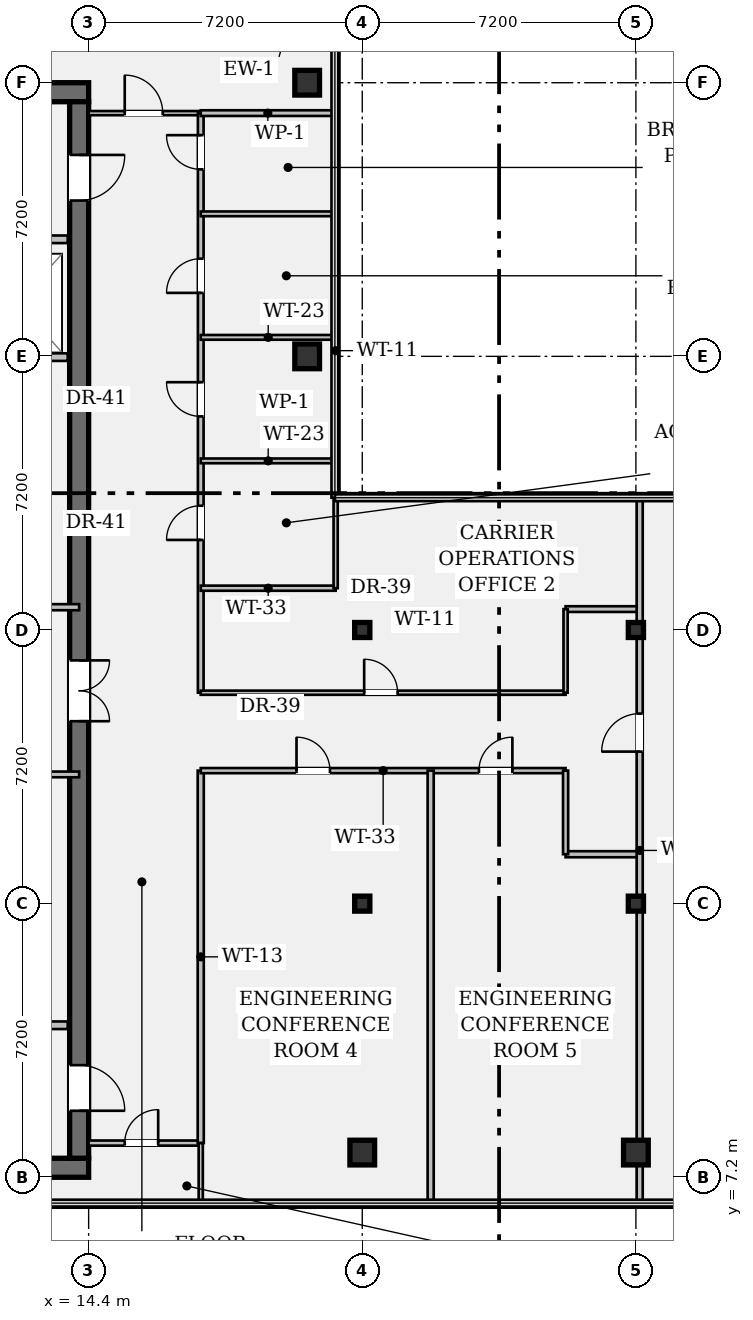
"""IFC4 building model, lengths in metres.
Left out: names, types, materials, properties, quantities, classifications, styles, units other than length and angle.
Written with IfcOpenShell. Run it as: python <this file> out.ifc"""

import sys

from ifc_helpers import new_model, si_unit, direction, frame, frame_2d, origin, origin_2d, place, context, subcontext, project, spatial, rectangle, hollow_rectangle, i_section, extrude, element, fill, save


model = new_model("IFC4")
c1 = context("Model", 3, precision=1e-05, world=origin(), true_north=direction((0.0, 1.0)))
c2 = subcontext(c1, "Body", "Model", "MODEL_VIEW")
j1 = project(units=[si_unit("LENGTHUNIT", "METRE"), si_unit("PLANEANGLEUNIT", "RADIAN")], contexts=[c1])
p1 = place(None, origin())
s1 = spatial("IfcSite", under=j1, at=p1, CompositionType="ELEMENT")
p2 = place(p1, origin())
s2 = spatial("IfcBuilding", under=s1, at=p2, CompositionType="ELEMENT")
p3 = place(p2, frame((0.0, 0.0, 269.15)))
s3 = spatial("IfcBuildingStorey", under=s2, at=p3, CompositionType="ELEMENT", Elevation=269.15)
for number, where, z_axis, x_axis in (
    (1, (0.5, 7.45, 0.0), (0.0, 0.0, 1.0), (1.0, 0.0, 0.0)),
    (2, (0.5, 35.75, 0.0), (0.0, 0.0, 1.0), (1.0, 0.0, 0.0)),
):
    element("IfcWall", number, at=place(p3, frame(where, z_axis=z_axis, x_axis=x_axis)), inside=s3, PredefinedType="SHEAR", context=c2, shape_type="SweptSolid", body=[
        extrude(rectangle(XDim=13.9, YDim=0.5, at=frame_2d((6.95, 0.0))), origin(), (0.0, 0.0, 1.0), 3.24),
    ])
p4 = place(p3, frame((14.15, 35.5, 0.0), z_axis=(0.0, 0.0, 1.0), x_axis=(0.0, -1.0, 0.0)))
e3 = element("IfcWall", 3, at=p4, inside=s3, PredefinedType="SHEAR", context=c2, shape_type="SweptSolid", body=[
    extrude(rectangle(XDim=27.8, YDim=0.5, at=frame_2d((13.9, 0.0))), origin(), (0.0, 0.0, 1.0), 3.24),
])
p5 = place(p4, frame((1.4, 0.0, 0.0)))
e4 = element("IfcOpeningElement", 4, at=p5, cuts=e3, PredefinedType="OPENING", context=c2, shape_type="SweptSolid", body=[
    extrude(rectangle(XDim=1.2, YDim=2.15, at=frame_2d((0.6, 1.075))), frame((0.0, 0.262, 0.0), z_axis=(0.0, -1.0, 0.0), x_axis=(1.0, 0.0, 0.0)), (0.0, 0.0, 1.0), 0.524),
])
p6 = place(p4, frame((25.35, 0.0, 0.0)))
e5 = element("IfcOpeningElement", 5, at=p6, cuts=e3, PredefinedType="OPENING", context=c2, shape_type="SweptSolid", body=[
    extrude(rectangle(XDim=1.2, YDim=2.15, at=frame_2d((0.6, 1.075))), frame((0.0, 0.262, 0.0), z_axis=(0.0, -1.0, 0.0), x_axis=(1.0, 0.0, 0.0)), (0.0, 0.0, 1.0), 0.524),
])
p7 = place(p4, frame((14.7, 0.0, 0.0)))
e6 = element("IfcOpeningElement", 6, at=p7, cuts=e3, PredefinedType="OPENING", context=c2, shape_type="SweptSolid", body=[
    extrude(rectangle(XDim=1.6, YDim=2.2, at=frame_2d((0.8, 1.1))), frame((0.0, 0.262, 0.0), z_axis=(0.0, -1.0, 0.0), x_axis=(1.0, 0.0, 0.0)), (0.0, 0.0, 1.0), 0.524),
])
for number, where, z_axis, x_axis in (
    (7, (20.15, 28.8, 0.0), (0.0, 0.0, 1.0), (1.0, 0.0, 0.0)),
    (8, (20.15, 36.0, 0.0), (0.0, 0.0, 1.0), (1.0, 0.0, 0.0)),
    (9, (21.6, 7.85, 0.0), (0.0, 0.0, 1.0), (1.0, 0.0, 0.0)),
):
    element("IfcColumn", number, at=place(p3, frame(where, z_axis=z_axis, x_axis=x_axis)), inside=s3, PredefinedType="COLUMN", context=c2, shape_type="SweptSolid", body=[
        extrude(hollow_rectangle(XDim=0.65, YDim=0.65, WallThickness=0.04, at=origin_2d()), origin(), (0.0, 0.0, 1.0), 3.24),
    ])
for number, where, z_axis, x_axis in (
    (10, (21.6, 14.4, 0.0), (0.0, 0.0, 1.0), (1.0, 0.0, 0.0)),
    (11, (21.6, 21.6, 0.0), (0.0, 0.0, 1.0), (1.0, 0.0, 0.0)),
):
    element("IfcColumn", number, at=place(p3, frame(where, z_axis=z_axis, x_axis=x_axis)), inside=s3, PredefinedType="COLUMN", context=c2, shape_type="SweptSolid", body=[
        extrude(i_section(OverallWidth=0.399, OverallDepth=0.394, WebThickness=0.023, FlangeThickness=0.037, FilletRadius=0.018, at=origin_2d()), origin(), (0.0, 0.0, 1.0), 3.24),
    ])
p8 = place(p3, frame((28.8, 7.85, 0.0), z_axis=(0.0, 0.0, 1.0), x_axis=(1.0, 0.0, 0.0)))
e12 = element("IfcColumn", 12, at=p8, inside=s3, PredefinedType="COLUMN", context=c2, shape_type="SweptSolid", body=[
    extrude(hollow_rectangle(XDim=0.65, YDim=0.65, WallThickness=0.04, at=origin_2d()), origin(), (0.0, 0.0, 1.0), 3.24),
])
for number, where, z_axis, x_axis in (
    (13, (28.8, 14.4, 0.0), (0.0, 0.0, 1.0), (1.0, 0.0, 0.0)),
    (14, (28.8, 21.6, 0.0), (0.0, 0.0, 1.0), (1.0, 0.0, 0.0)),
):
    element("IfcColumn", number, at=place(p3, frame(where, z_axis=z_axis, x_axis=x_axis)), inside=s3, PredefinedType="COLUMN", context=c2, shape_type="SweptSolid", body=[
        extrude(i_section(OverallWidth=0.399, OverallDepth=0.394, WebThickness=0.023, FlangeThickness=0.037, FilletRadius=0.018, at=origin_2d()), origin(), (0.0, 0.0, 1.0), 3.24),
    ])
p9 = place(p3, frame((8.7, 31.88, 0.0), z_axis=(0.0, 0.0, 1.0), x_axis=(1.0, 0.0, 0.0)))
e15 = element("IfcWall", 15, at=p9, inside=s3, PredefinedType="PARTITIONING", context=c2, shape_type="SweptSolid", body=[
    extrude(rectangle(XDim=5.15, YDim=0.2, at=frame_2d((2.575, 0.0))), origin(), (0.0, 0.0, 1.0), 3.24),
])
p10 = place(p9, frame((0.75, 0.0, 0.0)))
e16 = element("IfcOpeningElement", 16, at=p10, cuts=e15, PredefinedType="OPENING", context=c2, shape_type="SweptSolid", body=[
    extrude(rectangle(XDim=1.2, YDim=2.2, at=frame_2d((0.6, 1.1))), frame((0.0, 0.112, 0.0), z_axis=(0.0, -1.0, 0.0), x_axis=(1.0, 0.0, 0.0)), (0.0, 0.0, 1.0), 0.224),
])
p11 = place(p9, frame((3.25, 0.0, 0.0)))
e17 = element("IfcOpeningElement", 17, at=p11, cuts=e15, PredefinedType="OPENING", context=c2, shape_type="SweptSolid", body=[
    extrude(rectangle(XDim=1.2, YDim=2.2, at=frame_2d((0.6, 1.1))), frame((0.0, 0.112, 0.0), z_axis=(0.0, -1.0, 0.0), x_axis=(1.0, 0.0, 0.0)), (0.0, 0.0, 1.0), 0.224),
])
for number, where, z_axis, x_axis in (
    (18, (8.7, 11.2, 0.0), (0.0, 0.0, 1.0), (1.0, 0.0, 0.0)),
    (19, (8.7, 28.78, 0.0), (0.0, 0.0, 1.0), (1.0, 0.0, 0.0)),
):
    element("IfcWall", number, at=place(p3, frame(where, z_axis=z_axis, x_axis=x_axis)), inside=s3, PredefinedType="PARTITIONING", context=c2, shape_type="SweptSolid", body=[
        extrude(rectangle(XDim=5.15, YDim=0.2, at=frame_2d((2.575, 0.0))), origin(), (0.0, 0.0, 1.0), 3.24),
    ])
p12 = place(p3, frame((7.1, 22.2, 0.0), z_axis=(0.0, 0.0, 1.0), x_axis=(1.0, 0.0, 0.0)))
e20 = element("IfcWall", 20, at=p12, inside=s3, PredefinedType="PARTITIONING", context=c2, shape_type="SweptSolid", body=[
    extrude(rectangle(XDim=7.05, YDim=0.16, at=frame_2d((3.525, 0.0))), origin(), (0.0, 0.0, 1.0), 3.24),
])
p13 = place(p12, frame((2.4, 0.0, 0.0)))
e21 = element("IfcOpeningElement", 21, at=p13, cuts=e20, PredefinedType="OPENING", context=c2, shape_type="SweptSolid", body=[
    extrude(rectangle(XDim=1.0, YDim=2.15, at=frame_2d((0.5, 1.075))), frame((0.0, 0.092, 0.0), z_axis=(0.0, -1.0, 0.0), x_axis=(1.0, 0.0, 0.0)), (0.0, 0.0, 1.0), 0.184),
])
p14 = place(p3, frame((5.15, 17.8, 0.0), z_axis=(0.0, 0.0, 1.0), x_axis=(1.0, 0.0, 0.0)))
e22 = element("IfcWall", 22, at=p14, inside=s3, PredefinedType="PARTITIONING", context=c2, shape_type="SweptSolid", body=[
    extrude(rectangle(XDim=9.0, YDim=0.15, at=frame_2d((4.5, 0.0))), origin(), (0.0, 0.0, 1.0), 3.24),
])
p15 = place(p14, frame((2.65, 0.0, 0.0)))
e23 = element("IfcOpeningElement", 23, at=p15, cuts=e22, PredefinedType="OPENING", context=c2, shape_type="SweptSolid", body=[
    extrude(rectangle(XDim=0.9, YDim=2.15, at=frame_2d((0.45, 1.075))), frame((0.0, 0.087, 0.0), z_axis=(0.0, -1.0, 0.0), x_axis=(1.0, 0.0, 0.0)), (0.0, 0.0, 1.0), 0.174),
])
p16 = place(p14, frame((6.15, 0.0, 0.0)))
e24 = element("IfcOpeningElement", 24, at=p16, cuts=e22, PredefinedType="OPENING", context=c2, shape_type="SweptSolid", body=[
    extrude(rectangle(XDim=0.88, YDim=2.15, at=frame_2d((0.44, 1.075))), frame((0.0, 0.087, 0.0), z_axis=(0.0, -1.0, 0.0), x_axis=(1.0, 0.0, 0.0)), (0.0, 0.0, 1.0), 0.174),
])
p17 = place(p3, frame((14.4, 8.1, 0.0), z_axis=(0.0, 0.0, 1.0), x_axis=(1.0, 0.0, 0.0)))
e25 = element("IfcWall", 25, at=p17, inside=s3, PredefinedType="PARTITIONING", context=c2, shape_type="SweptSolid", body=[
    extrude(rectangle(XDim=2.95, YDim=0.135, at=frame_2d((1.475, 0.0))), origin(), (0.0, 0.0, 1.0), 3.24),
])
p18 = place(p17, frame((0.95, 0.0, 0.0)))
e26 = element("IfcOpeningElement", 26, at=p18, cuts=e25, PredefinedType="OPENING", context=c2, shape_type="SweptSolid", body=[
    extrude(rectangle(XDim=0.88, YDim=2.15, at=frame_2d((0.44, 1.075))), frame((0.0, 0.08, 0.0), z_axis=(0.0, -1.0, 0.0), x_axis=(1.0, 0.0, 0.0)), (0.0, 0.0, 1.0), 0.159),
])
p19 = place(p3, frame((14.4, 35.2, 0.0), z_axis=(0.0, 0.0, 1.0), x_axis=(1.0, 0.0, 0.0)))
e27 = element("IfcWall", 27, at=p19, inside=s3, PredefinedType="PARTITIONING", context=c2, shape_type="SweptSolid", body=[
    extrude(rectangle(XDim=2.95, YDim=0.11, at=frame_2d((1.475, 0.0))), origin(), (0.0, 0.0, 1.0), 2.808),
])
p20 = place(p19, frame((0.95, 0.0, 0.0)))
e28 = element("IfcOpeningElement", 28, at=p20, cuts=e27, PredefinedType="OPENING", context=c2, shape_type="SweptSolid", body=[
    extrude(rectangle(XDim=1.0, YDim=2.15, at=frame_2d((0.5, 1.075))), frame((0.0, 0.067, 0.0), z_axis=(0.0, -1.0, 0.0), x_axis=(1.0, 0.0, 0.0)), (0.0, 0.0, 1.0), 0.134),
])
p21 = place(p3, frame((17.35, 8.1, 0.0), z_axis=(0.0, 0.0, 1.0), x_axis=(0.0, 1.0, 0.0)))
e29 = element("IfcWall", 29, at=p21, inside=s3, PredefinedType="PARTITIONING", context=c2, shape_type="SweptSolid", body=[
    extrude(rectangle(XDim=9.8, YDim=0.16, at=frame_2d((4.9, 0.0))), origin(), (0.0, 0.0, 1.0), 2.676),
])
p22 = place(p3, frame((17.35, 19.95, 0.0), z_axis=(0.0, 0.0, 1.0), x_axis=(0.0, 1.0, 0.0)))
e30 = element("IfcWall", 30, at=p22, inside=s3, PredefinedType="PARTITIONING", context=c2, shape_type="SweptSolid", body=[
    extrude(rectangle(XDim=15.25, YDim=0.15, at=frame_2d((7.625, 0.0))), origin(), (0.0, 0.0, 1.0), 2.676),
])
p23 = place(p22, frame((4.02, 0.0, 0.0)))
e31 = element("IfcOpeningElement", 31, at=p23, cuts=e30, PredefinedType="OPENING", context=c2, shape_type="SweptSolid", body=[
    extrude(rectangle(XDim=0.9, YDim=2.15, at=frame_2d((0.45, 1.075))), frame((0.0, 0.087, 0.0), z_axis=(0.0, -1.0, 0.0), x_axis=(1.0, 0.0, 0.0)), (0.0, 0.0, 1.0), 0.174),
])
p24 = place(p22, frame((7.27, 0.0, 0.0)))
e32 = element("IfcOpeningElement", 32, at=p24, cuts=e30, PredefinedType="OPENING", context=c2, shape_type="SweptSolid", body=[
    extrude(rectangle(XDim=0.9, YDim=2.15, at=frame_2d((0.45, 1.075))), frame((0.0, 0.087, 0.0), z_axis=(0.0, -1.0, 0.0), x_axis=(1.0, 0.0, 0.0)), (0.0, 0.0, 1.0), 0.174),
])
p25 = place(p22, frame((10.52, 0.0, 0.0)))
e33 = element("IfcOpeningElement", 33, at=p25, cuts=e30, PredefinedType="OPENING", context=c2, shape_type="SweptSolid", body=[
    extrude(rectangle(XDim=0.9, YDim=2.15, at=frame_2d((0.45, 1.075))), frame((0.0, 0.087, 0.0), z_axis=(0.0, -1.0, 0.0), x_axis=(1.0, 0.0, 0.0)), (0.0, 0.0, 1.0), 0.174),
])
p26 = place(p22, frame((13.77, 0.0, 0.0)))
e34 = element("IfcOpeningElement", 34, at=p26, cuts=e30, PredefinedType="OPENING", context=c2, shape_type="SweptSolid", body=[
    extrude(rectangle(XDim=0.9, YDim=2.15, at=frame_2d((0.45, 1.075))), frame((0.0, 0.087, 0.0), z_axis=(0.0, -1.0, 0.0), x_axis=(1.0, 0.0, 0.0)), (0.0, 0.0, 1.0), 0.174),
])
p27 = place(p3, frame((17.35, 17.9, 0.0), z_axis=(0.0, 0.0, 1.0), x_axis=(1.0, 0.0, 0.0)))
e35 = element("IfcWall", 35, at=p27, inside=s3, PredefinedType="PARTITIONING", context=c2, shape_type="SweptSolid", body=[
    extrude(rectangle(XDim=9.6, YDim=0.135, at=frame_2d((4.8, 0.0))), origin(), (0.0, 0.0, 1.0), 2.676),
])
p28 = place(p27, frame((2.52, 0.0, 0.0)))
e36 = element("IfcOpeningElement", 36, at=p28, cuts=e35, PredefinedType="OPENING", context=c2, shape_type="SweptSolid", body=[
    extrude(rectangle(XDim=0.88, YDim=2.15, at=frame_2d((0.44, 1.075))), frame((0.0, 0.08, 0.0), z_axis=(0.0, -1.0, 0.0), x_axis=(1.0, 0.0, 0.0)), (0.0, 0.0, 1.0), 0.159),
])
p29 = place(p27, frame((7.32, 0.0, 0.0)))
e37 = element("IfcOpeningElement", 37, at=p29, cuts=e35, PredefinedType="OPENING", context=c2, shape_type="SweptSolid", body=[
    extrude(rectangle(XDim=0.88, YDim=2.15, at=frame_2d((0.44, 1.075))), frame((0.0, 0.08, 0.0), z_axis=(0.0, -1.0, 0.0), x_axis=(1.0, 0.0, 0.0)), (0.0, 0.0, 1.0), 0.159),
])
p30 = place(p3, frame((17.35, 19.95, 0.0), z_axis=(0.0, 0.0, 1.0), x_axis=(1.0, 0.0, 0.0)))
e38 = element("IfcWall", 38, at=p30, inside=s3, PredefinedType="PARTITIONING", context=c2, shape_type="SweptSolid", body=[
    extrude(rectangle(XDim=9.6, YDim=0.11, at=frame_2d((4.8, 0.0))), origin(), (0.0, 0.0, 1.0), 2.676),
])
p31 = place(p30, frame((4.3, 0.0, 0.0)))
e39 = element("IfcOpeningElement", 39, at=p31, cuts=e38, PredefinedType="OPENING", context=c2, shape_type="SweptSolid", body=[
    extrude(rectangle(XDim=0.88, YDim=2.15, at=frame_2d((0.44, 1.075))), frame((0.0, 0.067, 0.0), z_axis=(0.0, -1.0, 0.0), x_axis=(1.0, 0.0, 0.0)), (0.0, 0.0, 1.0), 0.134),
])
p32 = place(p3, frame((26.95, 15.7, 0.0), z_axis=(0.0, 0.0, 1.0), x_axis=(1.0, 0.0, 0.0)))
e40 = element("IfcWall", 40, at=p32, inside=s3, PredefinedType="PARTITIONING", context=c2, shape_type="SweptSolid", body=[
    extrude(rectangle(XDim=1.95, YDim=0.16, at=frame_2d((0.975, 0.0))), origin(), (0.0, 0.0, 1.0), 2.676),
])
p33 = place(p3, frame((26.95, 22.15, 0.0), z_axis=(0.0, 0.0, 1.0), x_axis=(1.0, 0.0, 0.0)))
e41 = element("IfcWall", 41, at=p33, inside=s3, PredefinedType="PARTITIONING", context=c2, shape_type="SweptSolid", body=[
    extrude(rectangle(XDim=1.95, YDim=0.15, at=frame_2d((0.975, 0.0))), origin(), (0.0, 0.0, 1.0), 3.24),
])
p34 = place(p3, frame((26.95, 15.7, 0.0), z_axis=(0.0, 0.0, 1.0), x_axis=(0.0, 1.0, 0.0)))
e42 = element("IfcWall", 42, at=p34, inside=s3, PredefinedType="PARTITIONING", context=c2, shape_type="SweptSolid", body=[
    extrude(rectangle(XDim=2.2, YDim=0.135, at=frame_2d((1.1, 0.0))), origin(), (0.0, 0.0, 1.0), 3.24),
])
p35 = place(p3, frame((26.95, 19.95, 0.0), z_axis=(0.0, 0.0, 1.0), x_axis=(0.0, 1.0, 0.0)))
e43 = element("IfcWall", 43, at=p35, inside=s3, PredefinedType="PARTITIONING", context=c2, shape_type="SweptSolid", body=[
    extrude(rectangle(XDim=2.2, YDim=0.11, at=frame_2d((1.1, 0.0))), origin(), (0.0, 0.0, 1.0), 2.676),
])
p36 = place(p3, frame((28.9, 6.52, 0.0), z_axis=(0.0, 0.0, 1.0), x_axis=(0.0, 1.0, 0.0)))
e44 = element("IfcWall", 44, at=p36, inside=s3, PredefinedType="PARTITIONING", context=c2, shape_type="SweptSolid", body=[
    extrude(rectangle(XDim=18.56, YDim=0.16, at=frame_2d((9.28, 0.0))), origin(), (0.0, 0.0, 1.0), 2.676),
])
p37 = place(p36, frame((11.88, 0.0, 0.0)))
e45 = element("IfcOpeningElement", 45, at=p37, cuts=e44, PredefinedType="OPENING", context=c2, shape_type="SweptSolid", body=[
    extrude(rectangle(XDim=1.0, YDim=2.15, at=frame_2d((0.5, 1.075))), frame((0.0, 0.092, 0.0), z_axis=(0.0, -1.0, 0.0), x_axis=(1.0, 0.0, 0.0)), (0.0, 0.0, 1.0), 0.184),
])
p38 = place(p3, frame((17.35, 35.2, 0.0), z_axis=(0.0, 0.0, 1.0), x_axis=(1.0, 0.0, 0.0)))
e46 = element("IfcWall", 46, at=p38, inside=s3, PredefinedType="PARTITIONING", context=c2, shape_type="SweptSolid", body=[
    extrude(rectangle(XDim=3.53, YDim=0.15, at=frame_2d((1.765, 0.0))), origin(), (0.0, 0.0, 1.0), 2.808),
])
p39 = place(p3, frame((17.35, 22.7, 0.0), z_axis=(0.0, 0.0, 1.0), x_axis=(1.0, 0.0, 0.0)))
e47 = element("IfcWall", 47, at=p39, inside=s3, PredefinedType="PARTITIONING", context=c2, shape_type="SweptSolid", body=[
    extrude(rectangle(XDim=3.55, YDim=0.135, at=frame_2d((1.775, 0.0))), origin(), (0.0, 0.0, 1.0), 2.808),
])
p40 = place(p3, frame((20.9, 22.7, 0.0), z_axis=(0.0, 0.0, 1.0), x_axis=(0.0, 1.0, 0.0)))
e48 = element("IfcWall", 48, at=p40, inside=s3, PredefinedType="PARTITIONING", context=c2, shape_type="SweptSolid", body=[
    extrude(rectangle(XDim=12.5, YDim=0.11, at=frame_2d((6.25, 0.0))), origin(), (0.0, 0.0, 1.0), 3.24),
])
for number, where, z_axis, x_axis in (
    (49, (17.35, 26.05, 0.0), (0.0, 0.0, 1.0), (1.0, 0.0, 0.0)),
    (50, (17.35, 29.3, 0.0), (0.0, 0.0, 1.0), (1.0, 0.0, 0.0)),
    (51, (17.35, 32.55, 0.0), (0.0, 0.0, 1.0), (1.0, 0.0, 0.0)),
):
    element("IfcWall", number, at=place(p3, frame(where, z_axis=z_axis, x_axis=x_axis)), inside=s3, PredefinedType="PARTITIONING", context=c2, shape_type="SweptSolid", body=[
        extrude(rectangle(XDim=3.55, YDim=0.125, at=frame_2d((1.775, 0.0))), origin(), (0.0, 0.0, 1.0), 2.808),
    ])
p41 = place(p3, frame((17.35, 6.52, 0.0), z_axis=(0.0, 0.0, 1.0), x_axis=(0.0, 1.0, 0.0)))
e52 = element("IfcWall", 52, at=p41, inside=s3, PredefinedType="PARTITIONING", context=c2, shape_type="SweptSolid", body=[
    extrude(rectangle(XDim=1.58, YDim=0.11, at=frame_2d((0.79, 0.0))), origin(), (0.0, 0.0, 1.0), 3.24),
])
p42 = place(p3, frame((23.4, 6.52, 0.0), z_axis=(0.0, 0.0, 1.0), x_axis=(0.0, 1.0, 0.0)))
e53 = element("IfcWall", 53, at=p42, inside=s3, PredefinedType="PARTITIONING", context=c2, shape_type="SweptSolid", body=[
    extrude(rectangle(XDim=11.38, YDim=0.16, at=frame_2d((5.69, 0.0))), origin(), (0.0, 0.0, 1.0), 2.676),
])
p43 = place(p5, origin())
e54 = element("IfcDoor", 54, at=p43, inside=s3, OperationType="SINGLE_SWING_LEFT", PredefinedType="DOOR", context=c2, shape_type="SweptSolid", body=[
    extrude(rectangle(XDim=1.2, YDim=2.15, at=frame_2d((0.6, 1.075))), frame((0.0, 0.025, 0.0), z_axis=(0.0, -1.0, 0.0), x_axis=(1.0, 0.0, 0.0)), (0.0, 0.0, 1.0), 0.05),
])
fill(e4, e54)
p44 = place(p6, origin())
e55 = element("IfcDoor", 55, at=p44, inside=s3, OperationType="SINGLE_SWING_RIGHT", PredefinedType="DOOR", context=c2, shape_type="SweptSolid", body=[
    extrude(rectangle(XDim=1.2, YDim=2.15, at=frame_2d((0.6, 1.075))), frame((0.0, 0.025, 0.0), z_axis=(0.0, -1.0, 0.0), x_axis=(1.0, 0.0, 0.0)), (0.0, 0.0, 1.0), 0.05),
])
fill(e5, e55)
p45 = place(p7, origin())
e56 = element("IfcDoor", 56, at=p45, inside=s3, OperationType="DOUBLE_DOOR_SINGLE_SWING", PredefinedType="DOOR", context=c2, shape_type="SweptSolid", body=[
    extrude(rectangle(XDim=1.6, YDim=2.2, at=frame_2d((0.8, 1.1))), frame((0.0, 0.025, 0.0), z_axis=(0.0, -1.0, 0.0), x_axis=(1.0, 0.0, 0.0)), (0.0, 0.0, 1.0), 0.05),
])
fill(e6, e56)
p46 = place(p20, origin())
e57 = element("IfcDoor", 57, at=p46, inside=s3, OperationType="SINGLE_SWING_LEFT", PredefinedType="DOOR", context=c2, shape_type="SweptSolid", body=[
    extrude(rectangle(XDim=1.0, YDim=2.15, at=frame_2d((0.5, 1.075))), frame((0.0, 0.025, 0.0), z_axis=(0.0, -1.0, 0.0), x_axis=(1.0, 0.0, 0.0)), (0.0, 0.0, 1.0), 0.05),
])
fill(e28, e57)
p47 = place(p23, origin())
e58 = element("IfcDoor", 58, at=p47, inside=s3, OperationType="SINGLE_SWING_LEFT", PredefinedType="DOOR", context=c2, shape_type="SweptSolid", body=[
    extrude(rectangle(XDim=0.9, YDim=2.15, at=frame_2d((0.45, 1.075))), frame((0.0, 0.025, 0.0), z_axis=(0.0, -1.0, 0.0), x_axis=(1.0, 0.0, 0.0)), (0.0, 0.0, 1.0), 0.05),
])
fill(e31, e58)
p48 = place(p24, origin())
e59 = element("IfcDoor", 59, at=p48, inside=s3, OperationType="SINGLE_SWING_RIGHT", PredefinedType="DOOR", context=c2, shape_type="SweptSolid", body=[
    extrude(rectangle(XDim=0.9, YDim=2.15, at=frame_2d((0.45, 1.075))), frame((0.0, 0.025, 0.0), z_axis=(0.0, -1.0, 0.0), x_axis=(1.0, 0.0, 0.0)), (0.0, 0.0, 1.0), 0.05),
])
fill(e32, e59)
p49 = place(p25, origin())
e60 = element("IfcDoor", 60, at=p49, inside=s3, OperationType="SINGLE_SWING_LEFT", PredefinedType="DOOR", context=c2, shape_type="SweptSolid", body=[
    extrude(rectangle(XDim=0.9, YDim=2.15, at=frame_2d((0.45, 1.075))), frame((0.0, 0.025, 0.0), z_axis=(0.0, -1.0, 0.0), x_axis=(1.0, 0.0, 0.0)), (0.0, 0.0, 1.0), 0.05),
])
fill(e33, e60)
p50 = place(p26, origin())
e61 = element("IfcDoor", 61, at=p50, inside=s3, OperationType="SINGLE_SWING_RIGHT", PredefinedType="DOOR", context=c2, shape_type="SweptSolid", body=[
    extrude(rectangle(XDim=0.9, YDim=2.15, at=frame_2d((0.45, 1.075))), frame((0.0, 0.025, 0.0), z_axis=(0.0, -1.0, 0.0), x_axis=(1.0, 0.0, 0.0)), (0.0, 0.0, 1.0), 0.05),
])
fill(e34, e61)
p51 = place(p31, origin())
e62 = element("IfcDoor", 62, at=p51, inside=s3, OperationType="SINGLE_SWING_LEFT", PredefinedType="DOOR", context=c2, shape_type="SweptSolid", body=[
    extrude(rectangle(XDim=0.88, YDim=2.15, at=frame_2d((0.44, 1.075))), frame((0.0, 0.025, 0.0), z_axis=(0.0, -1.0, 0.0), x_axis=(1.0, 0.0, 0.0)), (0.0, 0.0, 1.0), 0.05),
])
fill(e39, e62)
p52 = place(p18, origin())
e63 = element("IfcDoor", 63, at=p52, inside=s3, OperationType="SINGLE_SWING_RIGHT", PredefinedType="DOOR", context=c2, shape_type="SweptSolid", body=[
    extrude(rectangle(XDim=0.88, YDim=2.15, at=frame_2d((0.44, 1.075))), frame((0.0, 0.025, 0.0), z_axis=(0.0, -1.0, 0.0), x_axis=(1.0, 0.0, 0.0)), (0.0, 0.0, 1.0), 0.05),
])
fill(e26, e63)
p53 = place(p28, origin())
e64 = element("IfcDoor", 64, at=p53, inside=s3, OperationType="SINGLE_SWING_LEFT", PredefinedType="DOOR", context=c2, shape_type="SweptSolid", body=[
    extrude(rectangle(XDim=0.88, YDim=2.15, at=frame_2d((0.44, 1.075))), frame((0.0, 0.025, 0.0), z_axis=(0.0, -1.0, 0.0), x_axis=(1.0, 0.0, 0.0)), (0.0, 0.0, 1.0), 0.05),
])
fill(e36, e64)
p54 = place(p29, origin())
e65 = element("IfcDoor", 65, at=p54, inside=s3, OperationType="SINGLE_SWING_RIGHT", PredefinedType="DOOR", context=c2, shape_type="SweptSolid", body=[
    extrude(rectangle(XDim=0.88, YDim=2.15, at=frame_2d((0.44, 1.075))), frame((0.0, 0.025, 0.0), z_axis=(0.0, -1.0, 0.0), x_axis=(1.0, 0.0, 0.0)), (0.0, 0.0, 1.0), 0.05),
])
fill(e37, e65)
p55 = place(p37, origin())
e66 = element("IfcDoor", 66, at=p55, inside=s3, OperationType="SINGLE_SWING_LEFT", PredefinedType="DOOR", context=c2, shape_type="SweptSolid", body=[
    extrude(rectangle(XDim=1.0, YDim=2.15, at=frame_2d((0.5, 1.075))), frame((0.0, 0.025, 0.0), z_axis=(0.0, -1.0, 0.0), x_axis=(1.0, 0.0, 0.0)), (0.0, 0.0, 1.0), 0.05),
])
fill(e45, e66)
save(model, sys.argv[1])
